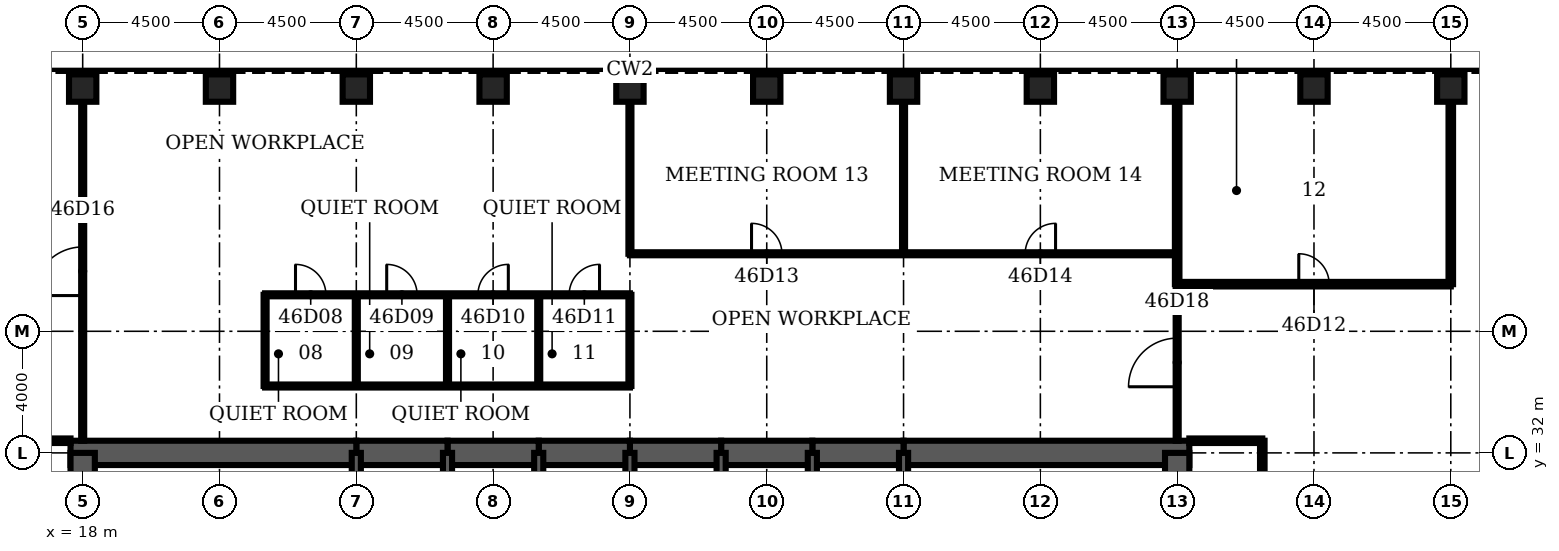
"""IFC4 building model, lengths in metres.
Left out: names, types, materials, properties, quantities, classifications, styles, units other than length and angle.
Written with IfcOpenShell. Run it as: python <this file> out.ifc"""

import sys

from ifc_helpers import new_model, si_unit, direction, frame, frame_2d, origin, origin_2d, place, context, subcontext, project, spatial, rectangle, hollow_rectangle, extrude, element, fill, save


model = new_model("IFC4")
c1 = context("Model", 3, precision=1e-05, world=origin(), true_north=direction((0.0, 1.0)))
c2 = subcontext(c1, "Body", "Model", "MODEL_VIEW")
j1 = project(units=[si_unit("LENGTHUNIT", "METRE"), si_unit("PLANEANGLEUNIT", "RADIAN")], contexts=[c1])
p1 = place(None, origin())
s1 = spatial("IfcSite", under=j1, at=p1, CompositionType="ELEMENT")
p2 = place(p1, origin())
s2 = spatial("IfcBuilding", under=s1, at=p2, CompositionType="ELEMENT")
p3 = place(p2, frame((0.0, 0.0, 206.8)))
s3 = spatial("IfcBuildingStorey", under=s2, at=p3, CompositionType="ELEMENT", Elevation=206.8)
for number, where, z_axis, x_axis in (
    (1, (63.0, 44.0, 0.0), (0.0, 0.0, 1.0), (0.0, 1.0, 0.0)),
    (2, (58.5, 44.0, 0.0), (0.0, 0.0, 1.0), (0.0, 1.0, 0.0)),
    (3, (54.0, 44.0, 0.0), (0.0, 0.0, 1.0), (0.0, 1.0, 0.0)),
    (4, (49.5, 44.0, 0.0), (0.0, 0.0, 1.0), (0.0, 1.0, 0.0)),
    (5, (45.0, 44.0, 0.0), (0.0, 0.0, 1.0), (0.0, 1.0, 0.0)),
    (6, (40.5, 44.0, 0.0), (0.0, 0.0, 1.0), (0.0, 1.0, 0.0)),
    (7, (36.0, 44.0, 0.0), (0.0, 0.0, 1.0), (0.0, 1.0, 0.0)),
    (8, (31.5, 44.0, 0.0), (0.0, 0.0, 1.0), (0.0, 1.0, 0.0)),
    (9, (27.0, 44.0, 0.0), (0.0, 0.0, 1.0), (0.0, 1.0, 0.0)),
    (10, (22.5, 44.0, 0.0), (0.0, 0.0, 1.0), (0.0, 1.0, 0.0)),
    (11, (18.0, 44.0, 0.0), (0.0, 0.0, 1.0), (0.0, 1.0, 0.0)),
):
    element("IfcColumn", number, at=place(p3, frame(where, z_axis=z_axis, x_axis=x_axis)), inside=s3, PredefinedType="COLUMN", context=c2, shape_type="SweptSolid", body=[
        extrude(hollow_rectangle(XDim=0.9, YDim=0.9, WallThickness=0.08, at=origin_2d()), origin(), (0.0, 0.0, 1.0), 4.2),
    ])
p4 = place(p3, frame((54.4, 32.0, 0.0), z_axis=(0.0, 0.0, 1.0), x_axis=(-1.0, 0.0, 0.0)))
e12 = element("IfcWall", 12, at=p4, inside=s3, PredefinedType="SHEAR", context=c2, shape_type="SweptSolid", body=[
    extrude(rectangle(XDim=9.4, YDim=0.8, at=frame_2d((4.7, 0.0))), origin(), (0.0, 0.0, 1.0), 4.2),
])
for number, where, z_axis, x_axis in (
    (13, (45.0, 32.0, 0.0), (0.0, 0.0, 1.0), (-1.0, 0.0, 0.0)),
    (14, (42.0, 32.0, 0.0), (0.0, 0.0, 1.0), (-1.0, 0.0, 0.0)),
    (15, (39.0, 32.0, 0.0), (0.0, 0.0, 1.0), (-1.0, 0.0, 0.0)),
    (16, (36.0, 32.0, 0.0), (0.0, 0.0, 1.0), (-1.0, 0.0, 0.0)),
    (17, (33.0, 32.0, 0.0), (0.0, 0.0, 1.0), (-1.0, 0.0, 0.0)),
    (18, (30.0, 32.0, 0.0), (0.0, 0.0, 1.0), (-1.0, 0.0, 0.0)),
):
    element("IfcWall", number, at=place(p3, frame(where, z_axis=z_axis, x_axis=x_axis)), inside=s3, PredefinedType="SHEAR", context=c2, shape_type="SweptSolid", body=[
        extrude(rectangle(XDim=3.0, YDim=0.8, at=frame_2d((1.5, 0.0))), origin(), (0.0, 0.0, 1.0), 4.2),
    ])
p5 = place(p3, frame((27.0, 32.0, 0.0), z_axis=(0.0, 0.0, 1.0), x_axis=(-1.0, 0.0, 0.0)))
e19 = element("IfcWall", 19, at=p5, inside=s3, PredefinedType="SHEAR", context=c2, shape_type="SweptSolid", body=[
    extrude(rectangle(XDim=9.4, YDim=0.8, at=frame_2d((4.7, 0.0))), origin(), (0.0, 0.0, 1.0), 4.2),
])
for number, where, z_axis, x_axis in (
    (20, (18.0, 32.0, 0.0), (0.0, 0.0, 1.0), (0.0, -1.0, 0.0)),
    (21, (54.0, 28.8, 0.0), (0.0, 0.0, 1.0), (0.0, 1.0, 0.0)),
):
    element("IfcWall", number, at=place(p3, frame(where, z_axis=z_axis, x_axis=x_axis)), inside=s3, PredefinedType="SHEAR", context=c2, shape_type="SweptSolid", body=[
        extrude(rectangle(XDim=3.2, YDim=0.8, at=frame_2d((1.6, 0.0))), origin(), (0.0, 0.0, 1.0), 4.2),
    ])
for number, where, z_axis, x_axis in (
    (22, (27.0, 28.8, 0.0), (0.0, 0.0, 1.0), (0.0, 1.0, 0.0)),
    (23, (30.0, 28.8, 0.0), (0.0, 0.0, 1.0), (0.0, 1.0, 0.0)),
    (24, (33.0, 28.8, 0.0), (0.0, 0.0, 1.0), (0.0, 1.0, 0.0)),
    (25, (36.0, 28.8, 0.0), (0.0, 0.0, 1.0), (0.0, 1.0, 0.0)),
    (26, (39.0, 28.8, 0.0), (0.0, 0.0, 1.0), (0.0, 1.0, 0.0)),
    (27, (42.0, 28.8, 0.0), (0.0, 0.0, 1.0), (0.0, 1.0, 0.0)),
    (28, (45.0, 28.8, 0.0), (0.0, 0.0, 1.0), (0.0, 1.0, 0.0)),
):
    element("IfcWall", number, at=place(p3, frame(where, z_axis=z_axis, x_axis=x_axis)), inside=s3, PredefinedType="SOLIDWALL", context=c2, shape_type="SweptSolid", body=[
        extrude(rectangle(XDim=3.2, YDim=0.3, at=frame_2d((1.6, 0.0))), origin(), (0.0, 0.0, 1.0), 4.2),
    ])
for number, where, z_axis, x_axis in (
    (29, (15.2, 32.4, 0.0), (0.0, 0.0, 1.0), (1.0, 0.0, 0.0)),
    (30, (54.4, 32.4, 0.0), (0.0, 0.0, 1.0), (1.0, 0.0, 0.0)),
):
    element("IfcWall", number, at=place(p3, frame(where, z_axis=z_axis, x_axis=x_axis)), inside=s3, PredefinedType="PARTITIONING", context=c2, shape_type="SweptSolid", body=[
        extrude(rectangle(XDim=2.4, YDim=0.15, at=frame_2d((1.2, 0.0))), origin(), (0.0, 0.0, 1.0), 3.0),
    ])
p6 = place(p3, frame((24.0, 34.2, 0.0), z_axis=(0.0, 0.0, 1.0), x_axis=(1.0, 0.0, 0.0)))
e31 = element("IfcWall", 31, at=p6, inside=s3, PredefinedType="PARTITIONING", context=c2, shape_type="SweptSolid", body=[
    extrude(rectangle(XDim=12.0, YDim=0.1, at=frame_2d((6.0, 0.0))), origin(), (0.0, 0.0, 1.0), 3.0),
])
p7 = place(p3, frame((24.0, 37.2, 0.0), z_axis=(0.0, 0.0, 1.0), x_axis=(1.0, 0.0, 0.0)))
e32 = element("IfcWall", 32, at=p7, inside=s3, PredefinedType="PARTITIONING", context=c2, shape_type="SweptSolid", body=[
    extrude(rectangle(XDim=12.0, YDim=0.1, at=frame_2d((6.0, 0.0))), origin(), (0.0, 0.0, 1.0), 3.0),
])
p8 = place(p7, frame((1.0, 0.0, 0.0)))
e33 = element("IfcOpeningElement", 33, at=p8, cuts=e32, PredefinedType="OPENING", context=c2, shape_type="SweptSolid", body=[
    extrude(rectangle(XDim=1.0, YDim=2.1, at=frame_2d((0.5, 1.05))), frame((0.0, 0.06, 0.0), z_axis=(0.0, -1.0, 0.0), x_axis=(1.0, 0.0, 0.0)), (0.0, 0.0, 1.0), 0.12),
])
p9 = place(p7, frame((4.0, 0.0, 0.0)))
e34 = element("IfcOpeningElement", 34, at=p9, cuts=e32, PredefinedType="OPENING", context=c2, shape_type="SweptSolid", body=[
    extrude(rectangle(XDim=1.0, YDim=2.1, at=frame_2d((0.5, 1.05))), frame((0.0, 0.06, 0.0), z_axis=(0.0, -1.0, 0.0), x_axis=(1.0, 0.0, 0.0)), (0.0, 0.0, 1.0), 0.12),
])
p10 = place(p7, frame((7.0, 0.0, 0.0)))
e35 = element("IfcOpeningElement", 35, at=p10, cuts=e32, PredefinedType="OPENING", context=c2, shape_type="SweptSolid", body=[
    extrude(rectangle(XDim=1.0, YDim=2.1, at=frame_2d((0.5, 1.05))), frame((0.0, 0.06, 0.0), z_axis=(0.0, -1.0, 0.0), x_axis=(1.0, 0.0, 0.0)), (0.0, 0.0, 1.0), 0.12),
])
p11 = place(p7, frame((10.0, 0.0, 0.0)))
e36 = element("IfcOpeningElement", 36, at=p11, cuts=e32, PredefinedType="OPENING", context=c2, shape_type="SweptSolid", body=[
    extrude(rectangle(XDim=1.0, YDim=2.1, at=frame_2d((0.5, 1.05))), frame((0.0, 0.06, 0.0), z_axis=(0.0, -1.0, 0.0), x_axis=(1.0, 0.0, 0.0)), (0.0, 0.0, 1.0), 0.12),
])
p12 = place(p3, frame((54.0, 37.55, 0.0), z_axis=(0.0, 0.0, 1.0), x_axis=(1.0, 0.0, 0.0)))
e37 = element("IfcWall", 37, at=p12, inside=s3, PredefinedType="PARTITIONING", context=c2, shape_type="SweptSolid", body=[
    extrude(rectangle(XDim=9.0, YDim=0.15, at=frame_2d((4.5, 0.0))), origin(), (0.0, 0.0, 1.0), 3.0),
])
p13 = place(p12, frame((4.0, 0.0, 0.0)))
e38 = element("IfcOpeningElement", 38, at=p13, cuts=e37, PredefinedType="OPENING", context=c2, shape_type="SweptSolid", body=[
    extrude(rectangle(XDim=1.0, YDim=2.1, at=frame_2d((0.5, 1.05))), frame((0.0, 0.085, 0.0), z_axis=(0.0, -1.0, 0.0), x_axis=(1.0, 0.0, 0.0)), (0.0, 0.0, 1.0), 0.17),
])
p14 = place(p3, frame((36.0, 38.55, 0.0), z_axis=(0.0, 0.0, 1.0), x_axis=(1.0, 0.0, 0.0)))
e39 = element("IfcWall", 39, at=p14, inside=s3, PredefinedType="PARTITIONING", context=c2, shape_type="SweptSolid", body=[
    extrude(rectangle(XDim=18.0, YDim=0.1, at=frame_2d((9.0, 0.0))), origin(), (0.0, 0.0, 1.0), 3.0),
])
p15 = place(p14, frame((4.0, 0.0, 0.0)))
e40 = element("IfcOpeningElement", 40, at=p15, cuts=e39, PredefinedType="OPENING", context=c2, shape_type="SweptSolid", body=[
    extrude(rectangle(XDim=1.0, YDim=2.1, at=frame_2d((0.5, 1.05))), frame((0.0, 0.06, 0.0), z_axis=(0.0, -1.0, 0.0), x_axis=(1.0, 0.0, 0.0)), (0.0, 0.0, 1.0), 0.12),
])
p16 = place(p14, frame((13.0, 0.0, 0.0)))
e41 = element("IfcOpeningElement", 41, at=p16, cuts=e39, PredefinedType="OPENING", context=c2, shape_type="SweptSolid", body=[
    extrude(rectangle(XDim=1.0, YDim=2.1, at=frame_2d((0.5, 1.05))), frame((0.0, 0.06, 0.0), z_axis=(0.0, -1.0, 0.0), x_axis=(1.0, 0.0, 0.0)), (0.0, 0.0, 1.0), 0.12),
])
p17 = place(p3, frame((18.0, 32.4, 0.0), z_axis=(0.0, 0.0, 1.0), x_axis=(0.0, 1.0, 0.0)))
e42 = element("IfcWall", 42, at=p17, inside=s3, PredefinedType="PARTITIONING", context=c2, shape_type="SweptSolid", body=[
    extrude(rectangle(XDim=11.15, YDim=0.1, at=frame_2d((5.575, 0.0))), origin(), (0.0, 0.0, 1.0), 3.0),
])
p18 = place(p17, frame((4.775, 0.0, 0.0)))
e43 = element("IfcOpeningElement", 43, at=p18, cuts=e42, PredefinedType="OPENING", context=c2, shape_type="SweptSolid", body=[
    extrude(rectangle(XDim=1.6, YDim=2.1, at=frame_2d((0.8, 1.05))), frame((0.0, 0.06, 0.0), z_axis=(0.0, -1.0, 0.0), x_axis=(1.0, 0.0, 0.0)), (0.0, 0.0, 1.0), 0.12),
])
for number, where, z_axis, x_axis in (
    (44, (24.0, 34.2, 0.0), (0.0, 0.0, 1.0), (0.0, 1.0, 0.0)),
    (45, (27.0, 34.2, 0.0), (0.0, 0.0, 1.0), (0.0, 1.0, 0.0)),
    (46, (30.0, 34.2, 0.0), (0.0, 0.0, 1.0), (0.0, 1.0, 0.0)),
    (47, (33.0, 34.2, 0.0), (0.0, 0.0, 1.0), (0.0, 1.0, 0.0)),
    (48, (36.0, 34.2, 0.0), (0.0, 0.0, 1.0), (0.0, 1.0, 0.0)),
):
    element("IfcWall", number, at=place(p3, frame(where, z_axis=z_axis, x_axis=x_axis)), inside=s3, PredefinedType="PARTITIONING", context=c2, shape_type="SweptSolid", body=[
        extrude(rectangle(XDim=3.0, YDim=0.1, at=frame_2d((1.5, 0.0))), origin(), (0.0, 0.0, 1.0), 3.0),
    ])
for number, where, z_axis, x_axis in (
    (49, (36.0, 38.55, 0.0), (0.0, 0.0, 1.0), (0.0, 1.0, 0.0)),
    (50, (45.0, 38.55, 0.0), (0.0, 0.0, 1.0), (0.0, 1.0, 0.0)),
):
    element("IfcWall", number, at=place(p3, frame(where, z_axis=z_axis, x_axis=x_axis)), inside=s3, PredefinedType="PARTITIONING", context=c2, shape_type="SweptSolid", body=[
        extrude(rectangle(XDim=5.0, YDim=0.1, at=frame_2d((2.5, 0.0))), origin(), (0.0, 0.0, 1.0), 3.0),
    ])
p19 = place(p3, frame((54.0, 32.4, 0.0), z_axis=(0.0, 0.0, 1.0), x_axis=(0.0, 1.0, 0.0)))
e51 = element("IfcWall", 51, at=p19, inside=s3, PredefinedType="PARTITIONING", context=c2, shape_type="SweptSolid", body=[
    extrude(rectangle(XDim=5.15, YDim=0.1, at=frame_2d((2.575, 0.0))), origin(), (0.0, 0.0, 1.0), 3.0),
])
p20 = place(p19, frame((1.775, 0.0, 0.0)))
e52 = element("IfcOpeningElement", 52, at=p20, cuts=e51, PredefinedType="OPENING", context=c2, shape_type="SweptSolid", body=[
    extrude(rectangle(XDim=1.6, YDim=2.1, at=frame_2d((0.8, 1.05))), frame((0.0, 0.06, 0.0), z_axis=(0.0, -1.0, 0.0), x_axis=(1.0, 0.0, 0.0)), (0.0, 0.0, 1.0), 0.12),
])
p21 = place(p3, frame((54.0, 37.55, 0.0), z_axis=(0.0, 0.0, 1.0), x_axis=(0.0, 1.0, 0.0)))
e53 = element("IfcWall", 53, at=p21, inside=s3, PredefinedType="PARTITIONING", context=c2, shape_type="SweptSolid", body=[
    extrude(rectangle(XDim=6.0, YDim=0.15, at=frame_2d((3.0, 0.0))), origin(), (0.0, 0.0, 1.0), 3.0),
])
p22 = place(p3, frame((56.8, 13.8, 0.0), z_axis=(0.0, 0.0, 1.0), x_axis=(0.0, 1.0, 0.0)))
e54 = element("IfcWall", 54, at=p22, inside=s3, PredefinedType="PARTITIONING", context=c2, shape_type="SweptSolid", body=[
    extrude(rectangle(XDim=18.6, YDim=0.15, at=frame_2d((9.3, 0.0))), origin(), (0.0, 0.0, 1.0), 3.0),
])
p23 = place(p22, frame((8.7, 0.0, 0.0)))
e55 = element("IfcOpeningElement", 55, at=p23, cuts=e54, PredefinedType="OPENING", context=c2, shape_type="SweptSolid", body=[
    extrude(rectangle(XDim=1.2, YDim=2.1, at=frame_2d((0.6, 1.05))), frame((0.0, 0.085, 0.0), z_axis=(0.0, -1.0, 0.0), x_axis=(1.0, 0.0, 0.0)), (0.0, 0.0, 1.0), 0.17),
])
p24 = place(p3, frame((63.0, 37.55, 0.0), z_axis=(0.0, 0.0, 1.0), x_axis=(0.0, 1.0, 0.0)))
e56 = element("IfcWall", 56, at=p24, inside=s3, PredefinedType="PARTITIONING", context=c2, shape_type="SweptSolid", body=[
    extrude(rectangle(XDim=6.0, YDim=0.15, at=frame_2d((3.0, 0.0))), origin(), (0.0, 0.0, 1.0), 3.0),
])
p25 = place(p8, origin())
e57 = element("IfcDoor", 57, at=p25, inside=s3, OperationType="SINGLE_SWING_LEFT", PredefinedType="DOOR", context=c2, shape_type="SweptSolid", body=[
    extrude(rectangle(XDim=1.0, YDim=2.1, at=frame_2d((0.5, 1.05))), frame((0.0, 0.025, 0.0), z_axis=(0.0, -1.0, 0.0), x_axis=(1.0, 0.0, 0.0)), (0.0, 0.0, 1.0), 0.05),
])
fill(e33, e57)
p26 = place(p9, origin())
e58 = element("IfcDoor", 58, at=p26, inside=s3, OperationType="SINGLE_SWING_LEFT", PredefinedType="DOOR", context=c2, shape_type="SweptSolid", body=[
    extrude(rectangle(XDim=1.0, YDim=2.1, at=frame_2d((0.5, 1.05))), frame((0.0, 0.025, 0.0), z_axis=(0.0, -1.0, 0.0), x_axis=(1.0, 0.0, 0.0)), (0.0, 0.0, 1.0), 0.05),
])
fill(e34, e58)
p27 = place(p10, origin())
e59 = element("IfcDoor", 59, at=p27, inside=s3, OperationType="SINGLE_SWING_RIGHT", PredefinedType="DOOR", context=c2, shape_type="SweptSolid", body=[
    extrude(rectangle(XDim=1.0, YDim=2.1, at=frame_2d((0.5, 1.05))), frame((0.0, 0.025, 0.0), z_axis=(0.0, -1.0, 0.0), x_axis=(1.0, 0.0, 0.0)), (0.0, 0.0, 1.0), 0.05),
])
fill(e35, e59)
p28 = place(p11, origin())
e60 = element("IfcDoor", 60, at=p28, inside=s3, OperationType="SINGLE_SWING_RIGHT", PredefinedType="DOOR", context=c2, shape_type="SweptSolid", body=[
    extrude(rectangle(XDim=1.0, YDim=2.1, at=frame_2d((0.5, 1.05))), frame((0.0, 0.025, 0.0), z_axis=(0.0, -1.0, 0.0), x_axis=(1.0, 0.0, 0.0)), (0.0, 0.0, 1.0), 0.05),
])
fill(e36, e60)
p29 = place(p13, origin())
e61 = element("IfcDoor", 61, at=p29, inside=s3, OperationType="SINGLE_SWING_LEFT", PredefinedType="DOOR", context=c2, shape_type="SweptSolid", body=[
    extrude(rectangle(XDim=1.0, YDim=2.1, at=frame_2d((0.5, 1.05))), frame((0.0, 0.025, 0.0), z_axis=(0.0, -1.0, 0.0), x_axis=(1.0, 0.0, 0.0)), (0.0, 0.0, 1.0), 0.05),
])
fill(e38, e61)
p30 = place(p15, origin())
e62 = element("IfcDoor", 62, at=p30, inside=s3, OperationType="SINGLE_SWING_LEFT", PredefinedType="DOOR", context=c2, shape_type="SweptSolid", body=[
    extrude(rectangle(XDim=1.0, YDim=2.1, at=frame_2d((0.5, 1.05))), frame((0.0, 0.025, 0.0), z_axis=(0.0, -1.0, 0.0), x_axis=(1.0, 0.0, 0.0)), (0.0, 0.0, 1.0), 0.05),
])
fill(e40, e62)
p31 = place(p16, origin())
e63 = element("IfcDoor", 63, at=p31, inside=s3, OperationType="SINGLE_SWING_RIGHT", PredefinedType="DOOR", context=c2, shape_type="SweptSolid", body=[
    extrude(rectangle(XDim=1.0, YDim=2.1, at=frame_2d((0.5, 1.05))), frame((0.0, 0.025, 0.0), z_axis=(0.0, -1.0, 0.0), x_axis=(1.0, 0.0, 0.0)), (0.0, 0.0, 1.0), 0.05),
])
fill(e41, e63)
p32 = place(p18, origin())
e64 = element("IfcDoor", 64, at=p32, inside=s3, OperationType="SINGLE_SWING_LEFT", PredefinedType="DOOR", context=c2, shape_type="SweptSolid", body=[
    extrude(rectangle(XDim=1.6, YDim=2.1, at=frame_2d((0.8, 1.05))), frame((0.0, 0.025, 0.0), z_axis=(0.0, -1.0, 0.0), x_axis=(1.0, 0.0, 0.0)), (0.0, 0.0, 1.0), 0.05),
])
fill(e43, e64)
p33 = place(p20, origin())
e65 = element("IfcDoor", 65, at=p33, inside=s3, OperationType="SINGLE_SWING_LEFT", PredefinedType="DOOR", context=c2, shape_type="SweptSolid", body=[
    extrude(rectangle(XDim=1.6, YDim=2.1, at=frame_2d((0.8, 1.05))), frame((0.0, 0.025, 0.0), z_axis=(0.0, -1.0, 0.0), x_axis=(1.0, 0.0, 0.0)), (0.0, 0.0, 1.0), 0.05),
])
fill(e52, e65)
save(model, sys.argv[1])
